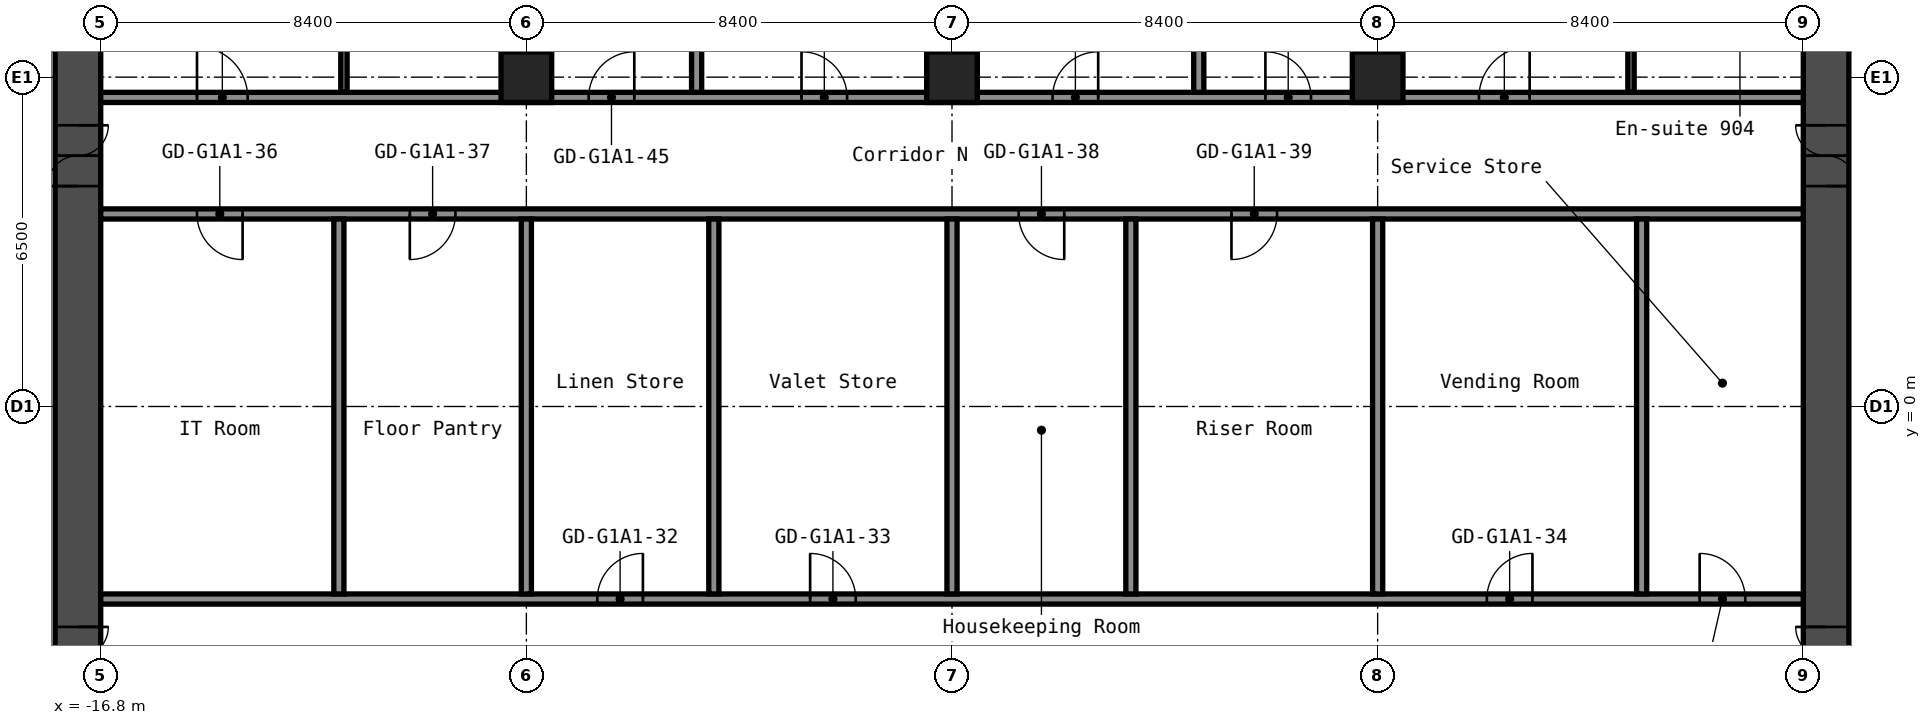
"""IFC4 building model, lengths in metres.
Left out: names, types, materials, properties, quantities, classifications, styles, units other than length and angle.
Written with IfcOpenShell. Run it as: python <this file> out.ifc"""

import sys

from ifc_helpers import new_model, si_unit, direction, frame, frame_2d, origin, origin_2d, place, context, subcontext, project, spatial, rectangle, hollow_rectangle, extrude, element, fill, save


model = new_model("IFC4")
c1 = context("Model", 3, precision=1e-05, world=origin(), true_north=direction((0.0, 1.0)))
c2 = subcontext(c1, "Body", "Model", "MODEL_VIEW")
j1 = project(units=[si_unit("LENGTHUNIT", "METRE"), si_unit("PLANEANGLEUNIT", "RADIAN")], contexts=[c1])
p1 = place(None, origin())
s1 = spatial("IfcSite", under=j1, at=p1, CompositionType="ELEMENT")
p2 = place(p1, origin())
s2 = spatial("IfcBuilding", under=s1, at=p2, CompositionType="ELEMENT")
p3 = place(p2, frame((0.0, 0.0, 35.8)))
s3 = spatial("IfcBuildingStorey", under=s2, at=p3, CompositionType="ELEMENT", Elevation=35.8)
for number, where, z_axis, x_axis in (
    (1, (-8.4, 6.5, 0.0), (0.0, 0.0, 1.0), (1.0, 0.0, 0.0)),
    (2, (0.0, 6.5, 0.0), (0.0, 0.0, 1.0), (1.0, 0.0, 0.0)),
    (3, (8.4, 6.5, 0.0), (0.0, 0.0, 1.0), (1.0, 0.0, 0.0)),
):
    element("IfcColumn", number, at=place(p3, frame(where, z_axis=z_axis, x_axis=x_axis)), inside=s3, PredefinedType="COLUMN", context=c2, shape_type="SweptSolid", body=[
        extrude(hollow_rectangle(XDim=1.0, YDim=1.0, WallThickness=0.04, at=origin_2d()), origin(), (0.0, 0.0, 1.0), 2.8),
    ])
p4 = place(p3, frame((-17.25, -8.4, 0.0), z_axis=(0.0, 0.0, 1.0), x_axis=(0.0, 1.0, 0.0)))
e4 = element("IfcWall", 4, at=p4, inside=s3, PredefinedType="SHEAR", context=c2, shape_type="SweptSolid", body=[
    extrude(rectangle(XDim=16.8, YDim=0.9, at=frame_2d((8.4, 0.0))), origin(), (0.0, 0.0, 1.0), 2.8),
])
p5 = place(p4, frame((12.75, 0.0, 0.0)))
e5 = element("IfcOpeningElement", 5, at=p5, cuts=e4, PredefinedType="OPENING", context=c2, shape_type="SweptSolid", body=[
    extrude(rectangle(XDim=1.2, YDim=2.1, at=frame_2d((0.6, 1.05))), frame((0.0, 0.46, 0.0), z_axis=(0.0, -1.0, 0.0), x_axis=(1.0, 0.0, 0.0)), (0.0, 0.0, 1.0), 0.92),
])
p6 = place(p4, frame((2.85, 0.0, 0.0)))
e6 = element("IfcOpeningElement", 6, at=p6, cuts=e4, PredefinedType="OPENING", context=c2, shape_type="SweptSolid", body=[
    extrude(rectangle(XDim=1.2, YDim=2.1, at=frame_2d((0.6, 1.05))), frame((0.0, 0.46, 0.0), z_axis=(0.0, -1.0, 0.0), x_axis=(1.0, 0.0, 0.0)), (0.0, 0.0, 1.0), 0.92),
])
p7 = place(p3, frame((17.25, -8.4, 0.0), z_axis=(0.0, 0.0, 1.0), x_axis=(0.0, 1.0, 0.0)))
e7 = element("IfcWall", 7, at=p7, inside=s3, PredefinedType="SHEAR", context=c2, shape_type="SweptSolid", body=[
    extrude(rectangle(XDim=16.8, YDim=0.9, at=frame_2d((8.4, 0.0))), origin(), (0.0, 0.0, 1.0), 2.8),
])
p8 = place(p7, frame((12.75, 0.0, 0.0)))
e8 = element("IfcOpeningElement", 8, at=p8, cuts=e7, PredefinedType="OPENING", context=c2, shape_type="SweptSolid", body=[
    extrude(rectangle(XDim=1.2, YDim=2.1, at=frame_2d((0.6, 1.05))), frame((0.0, 0.46, 0.0), z_axis=(0.0, -1.0, 0.0), x_axis=(1.0, 0.0, 0.0)), (0.0, 0.0, 1.0), 0.92),
])
p9 = place(p7, frame((2.85, 0.0, 0.0)))
e9 = element("IfcOpeningElement", 9, at=p9, cuts=e7, PredefinedType="OPENING", context=c2, shape_type="SweptSolid", body=[
    extrude(rectangle(XDim=1.2, YDim=2.1, at=frame_2d((0.6, 1.05))), frame((0.0, 0.46, 0.0), z_axis=(0.0, -1.0, 0.0), x_axis=(1.0, 0.0, 0.0)), (0.0, 0.0, 1.0), 0.92),
])
p10 = place(p3, frame((-16.8, -3.8, 0.0), z_axis=(0.0, 0.0, 1.0), x_axis=(1.0, 0.0, 0.0)))
e10 = element("IfcWall", 10, at=p10, inside=s3, PredefinedType="PARTITIONING", context=c2, shape_type="SweptSolid", body=[
    extrude(rectangle(XDim=33.6, YDim=0.2, at=frame_2d((16.8, 0.0))), origin(), (0.0, 0.0, 1.0), 2.8),
])
p11 = place(p10, frame((9.8, 0.0, 0.0)))
e11 = element("IfcOpeningElement", 11, at=p11, cuts=e10, PredefinedType="OPENING", context=c2, shape_type="SweptSolid", body=[
    extrude(rectangle(XDim=0.9, YDim=2.1, at=frame_2d((0.45, 1.05))), frame((0.0, 0.11, 0.0), z_axis=(0.0, -1.0, 0.0), x_axis=(1.0, 0.0, 0.0)), (0.0, 0.0, 1.0), 0.22),
])
p12 = place(p10, frame((14.0, 0.0, 0.0)))
e12 = element("IfcOpeningElement", 12, at=p12, cuts=e10, PredefinedType="OPENING", context=c2, shape_type="SweptSolid", body=[
    extrude(rectangle(XDim=0.9, YDim=2.1, at=frame_2d((0.45, 1.05))), frame((0.0, 0.11, 0.0), z_axis=(0.0, -1.0, 0.0), x_axis=(1.0, 0.0, 0.0)), (0.0, 0.0, 1.0), 0.22),
])
p13 = place(p10, frame((27.355, 0.0, 0.0)))
e13 = element("IfcOpeningElement", 13, at=p13, cuts=e10, PredefinedType="OPENING", context=c2, shape_type="SweptSolid", body=[
    extrude(rectangle(XDim=0.9, YDim=2.1, at=frame_2d((0.45, 1.05))), frame((0.0, 0.11, 0.0), z_axis=(0.0, -1.0, 0.0), x_axis=(1.0, 0.0, 0.0)), (0.0, 0.0, 1.0), 0.22),
])
p14 = place(p10, frame((31.555, 0.0, 0.0)))
e14 = element("IfcOpeningElement", 14, at=p14, cuts=e10, PredefinedType="OPENING", context=c2, shape_type="SweptSolid", body=[
    extrude(rectangle(XDim=0.9, YDim=2.1, at=frame_2d((0.45, 1.05))), frame((0.0, 0.11, 0.0), z_axis=(0.0, -1.0, 0.0), x_axis=(1.0, 0.0, 0.0)), (0.0, 0.0, 1.0), 0.22),
])
p15 = place(p3, frame((-16.8, 3.8, 0.0), z_axis=(0.0, 0.0, 1.0), x_axis=(1.0, 0.0, 0.0)))
e15 = element("IfcWall", 15, at=p15, inside=s3, PredefinedType="PARTITIONING", context=c2, shape_type="SweptSolid", body=[
    extrude(rectangle(XDim=33.6, YDim=0.2, at=frame_2d((16.8, 0.0))), origin(), (0.0, 0.0, 1.0), 2.8),
])
p16 = place(p15, frame((1.9, 0.0, 0.0)))
e16 = element("IfcOpeningElement", 16, at=p16, cuts=e15, PredefinedType="OPENING", context=c2, shape_type="SweptSolid", body=[
    extrude(rectangle(XDim=0.9, YDim=2.1, at=frame_2d((0.45, 1.05))), frame((0.0, 0.11, 0.0), z_axis=(0.0, -1.0, 0.0), x_axis=(1.0, 0.0, 0.0)), (0.0, 0.0, 1.0), 0.22),
])
p17 = place(p15, frame((6.1, 0.0, 0.0)))
e17 = element("IfcOpeningElement", 17, at=p17, cuts=e15, PredefinedType="OPENING", context=c2, shape_type="SweptSolid", body=[
    extrude(rectangle(XDim=0.9, YDim=2.1, at=frame_2d((0.45, 1.05))), frame((0.0, 0.11, 0.0), z_axis=(0.0, -1.0, 0.0), x_axis=(1.0, 0.0, 0.0)), (0.0, 0.0, 1.0), 0.22),
])
p18 = place(p15, frame((18.115, 0.0, 0.0)))
e18 = element("IfcOpeningElement", 18, at=p18, cuts=e15, PredefinedType="OPENING", context=c2, shape_type="SweptSolid", body=[
    extrude(rectangle(XDim=0.9, YDim=2.1, at=frame_2d((0.45, 1.05))), frame((0.0, 0.11, 0.0), z_axis=(0.0, -1.0, 0.0), x_axis=(1.0, 0.0, 0.0)), (0.0, 0.0, 1.0), 0.22),
])
p19 = place(p15, frame((22.315, 0.0, 0.0)))
e19 = element("IfcOpeningElement", 19, at=p19, cuts=e15, PredefinedType="OPENING", context=c2, shape_type="SweptSolid", body=[
    extrude(rectangle(XDim=0.9, YDim=2.1, at=frame_2d((0.45, 1.05))), frame((0.0, 0.11, 0.0), z_axis=(0.0, -1.0, 0.0), x_axis=(1.0, 0.0, 0.0)), (0.0, 0.0, 1.0), 0.22),
])
p20 = place(p3, frame((-16.8, 6.1, 0.0), z_axis=(0.0, 0.0, 1.0), x_axis=(1.0, 0.0, 0.0)))
e20 = element("IfcWall", 20, at=p20, inside=s3, PredefinedType="PARTITIONING", context=c2, shape_type="SweptSolid", body=[
    extrude(rectangle(XDim=33.6, YDim=0.2, at=frame_2d((16.8, 0.0))), origin(), (0.0, 0.0, 1.0), 2.8),
])
p21 = place(p20, frame((1.9, 0.0, 0.0)))
e21 = element("IfcOpeningElement", 21, at=p21, cuts=e20, PredefinedType="OPENING", context=c2, shape_type="SweptSolid", body=[
    extrude(rectangle(XDim=1.0, YDim=2.1, at=frame_2d((0.5, 1.05))), frame((0.0, 0.11, 0.0), z_axis=(0.0, -1.0, 0.0), x_axis=(1.0, 0.0, 0.0)), (0.0, 0.0, 1.0), 0.22),
])
p22 = place(p20, frame((9.63, 0.0, 0.0)))
e22 = element("IfcOpeningElement", 22, at=p22, cuts=e20, PredefinedType="OPENING", context=c2, shape_type="SweptSolid", body=[
    extrude(rectangle(XDim=0.9, YDim=2.1, at=frame_2d((0.45, 1.05))), frame((0.0, 0.11, 0.0), z_axis=(0.0, -1.0, 0.0), x_axis=(1.0, 0.0, 0.0)), (0.0, 0.0, 1.0), 0.22),
])
p23 = place(p20, frame((13.83, 0.0, 0.0)))
e23 = element("IfcOpeningElement", 23, at=p23, cuts=e20, PredefinedType="OPENING", context=c2, shape_type="SweptSolid", body=[
    extrude(rectangle(XDim=0.9, YDim=2.1, at=frame_2d((0.45, 1.05))), frame((0.0, 0.11, 0.0), z_axis=(0.0, -1.0, 0.0), x_axis=(1.0, 0.0, 0.0)), (0.0, 0.0, 1.0), 0.22),
])
p24 = place(p20, frame((18.785, 0.0, 0.0)))
e24 = element("IfcOpeningElement", 24, at=p24, cuts=e20, PredefinedType="OPENING", context=c2, shape_type="SweptSolid", body=[
    extrude(rectangle(XDim=0.9, YDim=2.1, at=frame_2d((0.45, 1.05))), frame((0.0, 0.11, 0.0), z_axis=(0.0, -1.0, 0.0), x_axis=(1.0, 0.0, 0.0)), (0.0, 0.0, 1.0), 0.22),
])
p25 = place(p20, frame((22.985, 0.0, 0.0)))
e25 = element("IfcOpeningElement", 25, at=p25, cuts=e20, PredefinedType="OPENING", context=c2, shape_type="SweptSolid", body=[
    extrude(rectangle(XDim=0.9, YDim=2.1, at=frame_2d((0.45, 1.05))), frame((0.0, 0.11, 0.0), z_axis=(0.0, -1.0, 0.0), x_axis=(1.0, 0.0, 0.0)), (0.0, 0.0, 1.0), 0.22),
])
p26 = place(p20, frame((27.2, 0.0, 0.0)))
e26 = element("IfcOpeningElement", 26, at=p26, cuts=e20, PredefinedType="OPENING", context=c2, shape_type="SweptSolid", body=[
    extrude(rectangle(XDim=1.0, YDim=2.1, at=frame_2d((0.5, 1.05))), frame((0.0, 0.11, 0.0), z_axis=(0.0, -1.0, 0.0), x_axis=(1.0, 0.0, 0.0)), (0.0, 0.0, 1.0), 0.22),
])
p27 = place(p3, frame((-12.1, -3.7, 0.0), z_axis=(0.0, 0.0, 1.0), x_axis=(0.0, 1.0, 0.0)))
e27 = element("IfcWall", 27, at=p27, inside=s3, PredefinedType="PARTITIONING", context=c2, shape_type="SweptSolid", body=[
    extrude(rectangle(XDim=7.4, YDim=0.2, at=frame_2d((3.7, 0.0))), origin(), (0.0, 0.0, 1.0), 2.8),
])
p28 = place(p3, frame((-12.0, 6.2, 0.0), z_axis=(0.0, 0.0, 1.0), x_axis=(0.0, 1.0, 0.0)))
e28 = element("IfcWall", 28, at=p28, inside=s3, PredefinedType="PARTITIONING", context=c2, shape_type="SweptSolid", body=[
    extrude(rectangle(XDim=3.3, YDim=0.125, at=frame_2d((1.65, 0.0))), origin(), (0.0, 0.0, 1.0), 2.8),
])
p29 = place(p28, frame((1.1, 0.0, 0.0)))
e29 = element("IfcOpeningElement", 29, at=p29, cuts=e28, PredefinedType="OPENING", context=c2, shape_type="SweptSolid", body=[
    extrude(rectangle(XDim=1.0, YDim=2.1, at=frame_2d((0.5, 1.05))), frame((0.0, 0.073, 0.0), z_axis=(0.0, -1.0, 0.0), x_axis=(1.0, 0.0, 0.0)), (0.0, 0.0, 1.0), 0.145),
])
p30 = place(p3, frame((-8.4, -3.7, 0.0), z_axis=(0.0, 0.0, 1.0), x_axis=(0.0, 1.0, 0.0)))
e30 = element("IfcWall", 30, at=p30, inside=s3, PredefinedType="PARTITIONING", context=c2, shape_type="SweptSolid", body=[
    extrude(rectangle(XDim=7.4, YDim=0.2, at=frame_2d((3.7, 0.0))), origin(), (0.0, 0.0, 1.0), 2.8),
])
p31 = place(p3, frame((-8.4, 6.99, 0.0), z_axis=(0.0, 0.0, 1.0), x_axis=(0.0, 1.0, 0.0)))
e31 = element("IfcWall", 31, at=p31, inside=s3, PredefinedType="PARTITIONING", context=c2, shape_type="SweptSolid", body=[
    extrude(rectangle(XDim=13.31, YDim=0.2, at=frame_2d((6.655, 0.0))), origin(), (0.0, 0.0, 1.0), 2.8),
])
p32 = place(p3, frame((-5.04, 6.2, 0.0), z_axis=(0.0, 0.0, 1.0), x_axis=(0.0, 1.0, 0.0)))
e32 = element("IfcWall", 32, at=p32, inside=s3, PredefinedType="PARTITIONING", context=c2, shape_type="SweptSolid", body=[
    extrude(rectangle(XDim=14.1, YDim=0.2, at=frame_2d((7.05, 0.0))), origin(), (0.0, 0.0, 1.0), 2.8),
])
for number, where, z_axis, x_axis in (
    (33, (-4.7, -3.7, 0.0), (0.0, 0.0, 1.0), (0.0, 1.0, 0.0)),
    (34, (0.0, -3.7, 0.0), (0.0, 0.0, 1.0), (0.0, 1.0, 0.0)),
):
    element("IfcWall", number, at=place(p3, frame(where, z_axis=z_axis, x_axis=x_axis)), inside=s3, PredefinedType="PARTITIONING", context=c2, shape_type="SweptSolid", body=[
        extrude(rectangle(XDim=7.4, YDim=0.2, at=frame_2d((3.7, 0.0))), origin(), (0.0, 0.0, 1.0), 2.8),
    ])
p33 = place(p3, frame((0.0, 6.99, 0.0), z_axis=(0.0, 0.0, 1.0), x_axis=(0.0, 1.0, 0.0)))
e35 = element("IfcWall", 35, at=p33, inside=s3, PredefinedType="PARTITIONING", context=c2, shape_type="SweptSolid", body=[
    extrude(rectangle(XDim=13.31, YDim=0.2, at=frame_2d((6.655, 0.0))), origin(), (0.0, 0.0, 1.0), 2.8),
])
p34 = place(p3, frame((3.53, -3.7, 0.0), z_axis=(0.0, 0.0, 1.0), x_axis=(0.0, 1.0, 0.0)))
e36 = element("IfcWall", 36, at=p34, inside=s3, PredefinedType="PARTITIONING", context=c2, shape_type="SweptSolid", body=[
    extrude(rectangle(XDim=7.4, YDim=0.2, at=frame_2d((3.7, 0.0))), origin(), (0.0, 0.0, 1.0), 2.8),
])
p35 = place(p3, frame((4.87, 6.2, 0.0), z_axis=(0.0, 0.0, 1.0), x_axis=(0.0, 1.0, 0.0)))
e37 = element("IfcWall", 37, at=p35, inside=s3, PredefinedType="PARTITIONING", context=c2, shape_type="SweptSolid", body=[
    extrude(rectangle(XDim=14.1, YDim=0.2, at=frame_2d((7.05, 0.0))), origin(), (0.0, 0.0, 1.0), 2.8),
])
p36 = place(p3, frame((8.4, -3.7, 0.0), z_axis=(0.0, 0.0, 1.0), x_axis=(0.0, 1.0, 0.0)))
e38 = element("IfcWall", 38, at=p36, inside=s3, PredefinedType="PARTITIONING", context=c2, shape_type="SweptSolid", body=[
    extrude(rectangle(XDim=7.4, YDim=0.2, at=frame_2d((3.7, 0.0))), origin(), (0.0, 0.0, 1.0), 2.8),
])
p37 = place(p3, frame((8.4, 6.99, 0.0), z_axis=(0.0, 0.0, 1.0), x_axis=(0.0, 1.0, 0.0)))
e39 = element("IfcWall", 39, at=p37, inside=s3, PredefinedType="PARTITIONING", context=c2, shape_type="SweptSolid", body=[
    extrude(rectangle(XDim=13.31, YDim=0.2, at=frame_2d((6.655, 0.0))), origin(), (0.0, 0.0, 1.0), 2.8),
])
p38 = place(p3, frame((13.4, 6.2, 0.0), z_axis=(0.0, 0.0, 1.0), x_axis=(0.0, 1.0, 0.0)))
e40 = element("IfcWall", 40, at=p38, inside=s3, PredefinedType="PARTITIONING", context=c2, shape_type="SweptSolid", body=[
    extrude(rectangle(XDim=3.3, YDim=0.125, at=frame_2d((1.65, 0.0))), origin(), (0.0, 0.0, 1.0), 2.8),
])
p39 = place(p3, frame((13.61, -3.7, 0.0), z_axis=(0.0, 0.0, 1.0), x_axis=(0.0, 1.0, 0.0)))
e41 = element("IfcWall", 41, at=p39, inside=s3, PredefinedType="PARTITIONING", context=c2, shape_type="SweptSolid", body=[
    extrude(rectangle(XDim=7.4, YDim=0.2, at=frame_2d((3.7, 0.0))), origin(), (0.0, 0.0, 1.0), 2.8),
])
p40 = place(p5, origin())
e42 = element("IfcDoor", 42, at=p40, inside=s3, OperationType="DOUBLE_DOOR_SINGLE_SWING", PredefinedType="DOOR", context=c2, shape_type="SweptSolid", body=[
    extrude(rectangle(XDim=1.2, YDim=2.1, at=frame_2d((0.6, 1.05))), frame((0.0, 0.025, 0.0), z_axis=(0.0, -1.0, 0.0), x_axis=(1.0, 0.0, 0.0)), (0.0, 0.0, 1.0), 0.05),
])
fill(e5, e42)
p41 = place(p6, origin())
e43 = element("IfcDoor", 43, at=p41, inside=s3, OperationType="DOUBLE_DOOR_SINGLE_SWING", PredefinedType="DOOR", context=c2, shape_type="SweptSolid", body=[
    extrude(rectangle(XDim=1.2, YDim=2.1, at=frame_2d((0.6, 1.05))), frame((0.0, 0.025, 0.0), z_axis=(0.0, -1.0, 0.0), x_axis=(1.0, 0.0, 0.0)), (0.0, 0.0, 1.0), 0.05),
])
fill(e6, e43)
p42 = place(p8, origin())
e44 = element("IfcDoor", 44, at=p42, inside=s3, OperationType="DOUBLE_DOOR_SINGLE_SWING", PredefinedType="DOOR", context=c2, shape_type="SweptSolid", body=[
    extrude(rectangle(XDim=1.2, YDim=2.1, at=frame_2d((0.6, 1.05))), frame((0.0, 0.025, 0.0), z_axis=(0.0, -1.0, 0.0), x_axis=(1.0, 0.0, 0.0)), (0.0, 0.0, 1.0), 0.05),
])
fill(e8, e44)
p43 = place(p9, origin())
e45 = element("IfcDoor", 45, at=p43, inside=s3, OperationType="DOUBLE_DOOR_SINGLE_SWING", PredefinedType="DOOR", context=c2, shape_type="SweptSolid", body=[
    extrude(rectangle(XDim=1.2, YDim=2.1, at=frame_2d((0.6, 1.05))), frame((0.0, 0.025, 0.0), z_axis=(0.0, -1.0, 0.0), x_axis=(1.0, 0.0, 0.0)), (0.0, 0.0, 1.0), 0.05),
])
fill(e9, e45)
p44 = place(p11, origin())
e46 = element("IfcDoor", 46, at=p44, inside=s3, OperationType="SINGLE_SWING_LEFT", PredefinedType="DOOR", context=c2, shape_type="SweptSolid", body=[
    extrude(rectangle(XDim=0.9, YDim=2.1, at=frame_2d((0.45, 1.05))), frame((0.0, 0.025, 0.0), z_axis=(0.0, -1.0, 0.0), x_axis=(1.0, 0.0, 0.0)), (0.0, 0.0, 1.0), 0.05),
])
fill(e11, e46)
p45 = place(p12, origin())
e47 = element("IfcDoor", 47, at=p45, inside=s3, OperationType="SINGLE_SWING_RIGHT", PredefinedType="DOOR", context=c2, shape_type="SweptSolid", body=[
    extrude(rectangle(XDim=0.9, YDim=2.1, at=frame_2d((0.45, 1.05))), frame((0.0, 0.025, 0.0), z_axis=(0.0, -1.0, 0.0), x_axis=(1.0, 0.0, 0.0)), (0.0, 0.0, 1.0), 0.05),
])
fill(e12, e47)
p46 = place(p13, origin())
e48 = element("IfcDoor", 48, at=p46, inside=s3, OperationType="SINGLE_SWING_LEFT", PredefinedType="DOOR", context=c2, shape_type="SweptSolid", body=[
    extrude(rectangle(XDim=0.9, YDim=2.1, at=frame_2d((0.45, 1.05))), frame((0.0, 0.025, 0.0), z_axis=(0.0, -1.0, 0.0), x_axis=(1.0, 0.0, 0.0)), (0.0, 0.0, 1.0), 0.05),
])
fill(e13, e48)
p47 = place(p14, origin())
e49 = element("IfcDoor", 49, at=p47, inside=s3, OperationType="SINGLE_SWING_RIGHT", PredefinedType="DOOR", context=c2, shape_type="SweptSolid", body=[
    extrude(rectangle(XDim=0.9, YDim=2.1, at=frame_2d((0.45, 1.05))), frame((0.0, 0.025, 0.0), z_axis=(0.0, -1.0, 0.0), x_axis=(1.0, 0.0, 0.0)), (0.0, 0.0, 1.0), 0.05),
])
fill(e14, e49)
p48 = place(p16, origin())
e50 = element("IfcDoor", 50, at=p48, inside=s3, OperationType="SINGLE_SWING_RIGHT", PredefinedType="DOOR", context=c2, shape_type="SweptSolid", body=[
    extrude(rectangle(XDim=0.9, YDim=2.1, at=frame_2d((0.45, 1.05))), frame((0.0, 0.025, 0.0), z_axis=(0.0, -1.0, 0.0), x_axis=(1.0, 0.0, 0.0)), (0.0, 0.0, 1.0), 0.05),
])
fill(e16, e50)
p49 = place(p17, origin())
e51 = element("IfcDoor", 51, at=p49, inside=s3, OperationType="SINGLE_SWING_LEFT", PredefinedType="DOOR", context=c2, shape_type="SweptSolid", body=[
    extrude(rectangle(XDim=0.9, YDim=2.1, at=frame_2d((0.45, 1.05))), frame((0.0, 0.025, 0.0), z_axis=(0.0, -1.0, 0.0), x_axis=(1.0, 0.0, 0.0)), (0.0, 0.0, 1.0), 0.05),
])
fill(e17, e51)
p50 = place(p18, origin())
e52 = element("IfcDoor", 52, at=p50, inside=s3, OperationType="SINGLE_SWING_RIGHT", PredefinedType="DOOR", context=c2, shape_type="SweptSolid", body=[
    extrude(rectangle(XDim=0.9, YDim=2.1, at=frame_2d((0.45, 1.05))), frame((0.0, 0.025, 0.0), z_axis=(0.0, -1.0, 0.0), x_axis=(1.0, 0.0, 0.0)), (0.0, 0.0, 1.0), 0.05),
])
fill(e18, e52)
p51 = place(p19, origin())
e53 = element("IfcDoor", 53, at=p51, inside=s3, OperationType="SINGLE_SWING_LEFT", PredefinedType="DOOR", context=c2, shape_type="SweptSolid", body=[
    extrude(rectangle(XDim=0.9, YDim=2.1, at=frame_2d((0.45, 1.05))), frame((0.0, 0.025, 0.0), z_axis=(0.0, -1.0, 0.0), x_axis=(1.0, 0.0, 0.0)), (0.0, 0.0, 1.0), 0.05),
])
fill(e19, e53)
p52 = place(p21, origin())
e54 = element("IfcDoor", 54, at=p52, inside=s3, OperationType="SINGLE_SWING_RIGHT", PredefinedType="DOOR", context=c2, shape_type="SweptSolid", body=[
    extrude(rectangle(XDim=1.0, YDim=2.1, at=frame_2d((0.5, 1.05))), frame((0.0, 0.025, 0.0), z_axis=(0.0, -1.0, 0.0), x_axis=(1.0, 0.0, 0.0)), (0.0, 0.0, 1.0), 0.05),
])
fill(e21, e54)
p53 = place(p22, origin())
e55 = element("IfcDoor", 55, at=p53, inside=s3, OperationType="SINGLE_SWING_LEFT", PredefinedType="DOOR", context=c2, shape_type="SweptSolid", body=[
    extrude(rectangle(XDim=0.9, YDim=2.1, at=frame_2d((0.45, 1.05))), frame((0.0, 0.025, 0.0), z_axis=(0.0, -1.0, 0.0), x_axis=(1.0, 0.0, 0.0)), (0.0, 0.0, 1.0), 0.05),
])
fill(e22, e55)
p54 = place(p23, origin())
e56 = element("IfcDoor", 56, at=p54, inside=s3, OperationType="SINGLE_SWING_RIGHT", PredefinedType="DOOR", context=c2, shape_type="SweptSolid", body=[
    extrude(rectangle(XDim=0.9, YDim=2.1, at=frame_2d((0.45, 1.05))), frame((0.0, 0.025, 0.0), z_axis=(0.0, -1.0, 0.0), x_axis=(1.0, 0.0, 0.0)), (0.0, 0.0, 1.0), 0.05),
])
fill(e23, e56)
p55 = place(p24, origin())
e57 = element("IfcDoor", 57, at=p55, inside=s3, OperationType="SINGLE_SWING_LEFT", PredefinedType="DOOR", context=c2, shape_type="SweptSolid", body=[
    extrude(rectangle(XDim=0.9, YDim=2.1, at=frame_2d((0.45, 1.05))), frame((0.0, 0.025, 0.0), z_axis=(0.0, -1.0, 0.0), x_axis=(1.0, 0.0, 0.0)), (0.0, 0.0, 1.0), 0.05),
])
fill(e24, e57)
p56 = place(p25, origin())
e58 = element("IfcDoor", 58, at=p56, inside=s3, OperationType="SINGLE_SWING_RIGHT", PredefinedType="DOOR", context=c2, shape_type="SweptSolid", body=[
    extrude(rectangle(XDim=0.9, YDim=2.1, at=frame_2d((0.45, 1.05))), frame((0.0, 0.025, 0.0), z_axis=(0.0, -1.0, 0.0), x_axis=(1.0, 0.0, 0.0)), (0.0, 0.0, 1.0), 0.05),
])
fill(e25, e58)
p57 = place(p26, origin())
e59 = element("IfcDoor", 59, at=p57, inside=s3, OperationType="SINGLE_SWING_LEFT", PredefinedType="DOOR", context=c2, shape_type="SweptSolid", body=[
    extrude(rectangle(XDim=1.0, YDim=2.1, at=frame_2d((0.5, 1.05))), frame((0.0, 0.025, 0.0), z_axis=(0.0, -1.0, 0.0), x_axis=(1.0, 0.0, 0.0)), (0.0, 0.0, 1.0), 0.05),
])
fill(e26, e59)
save(model, sys.argv[1])
